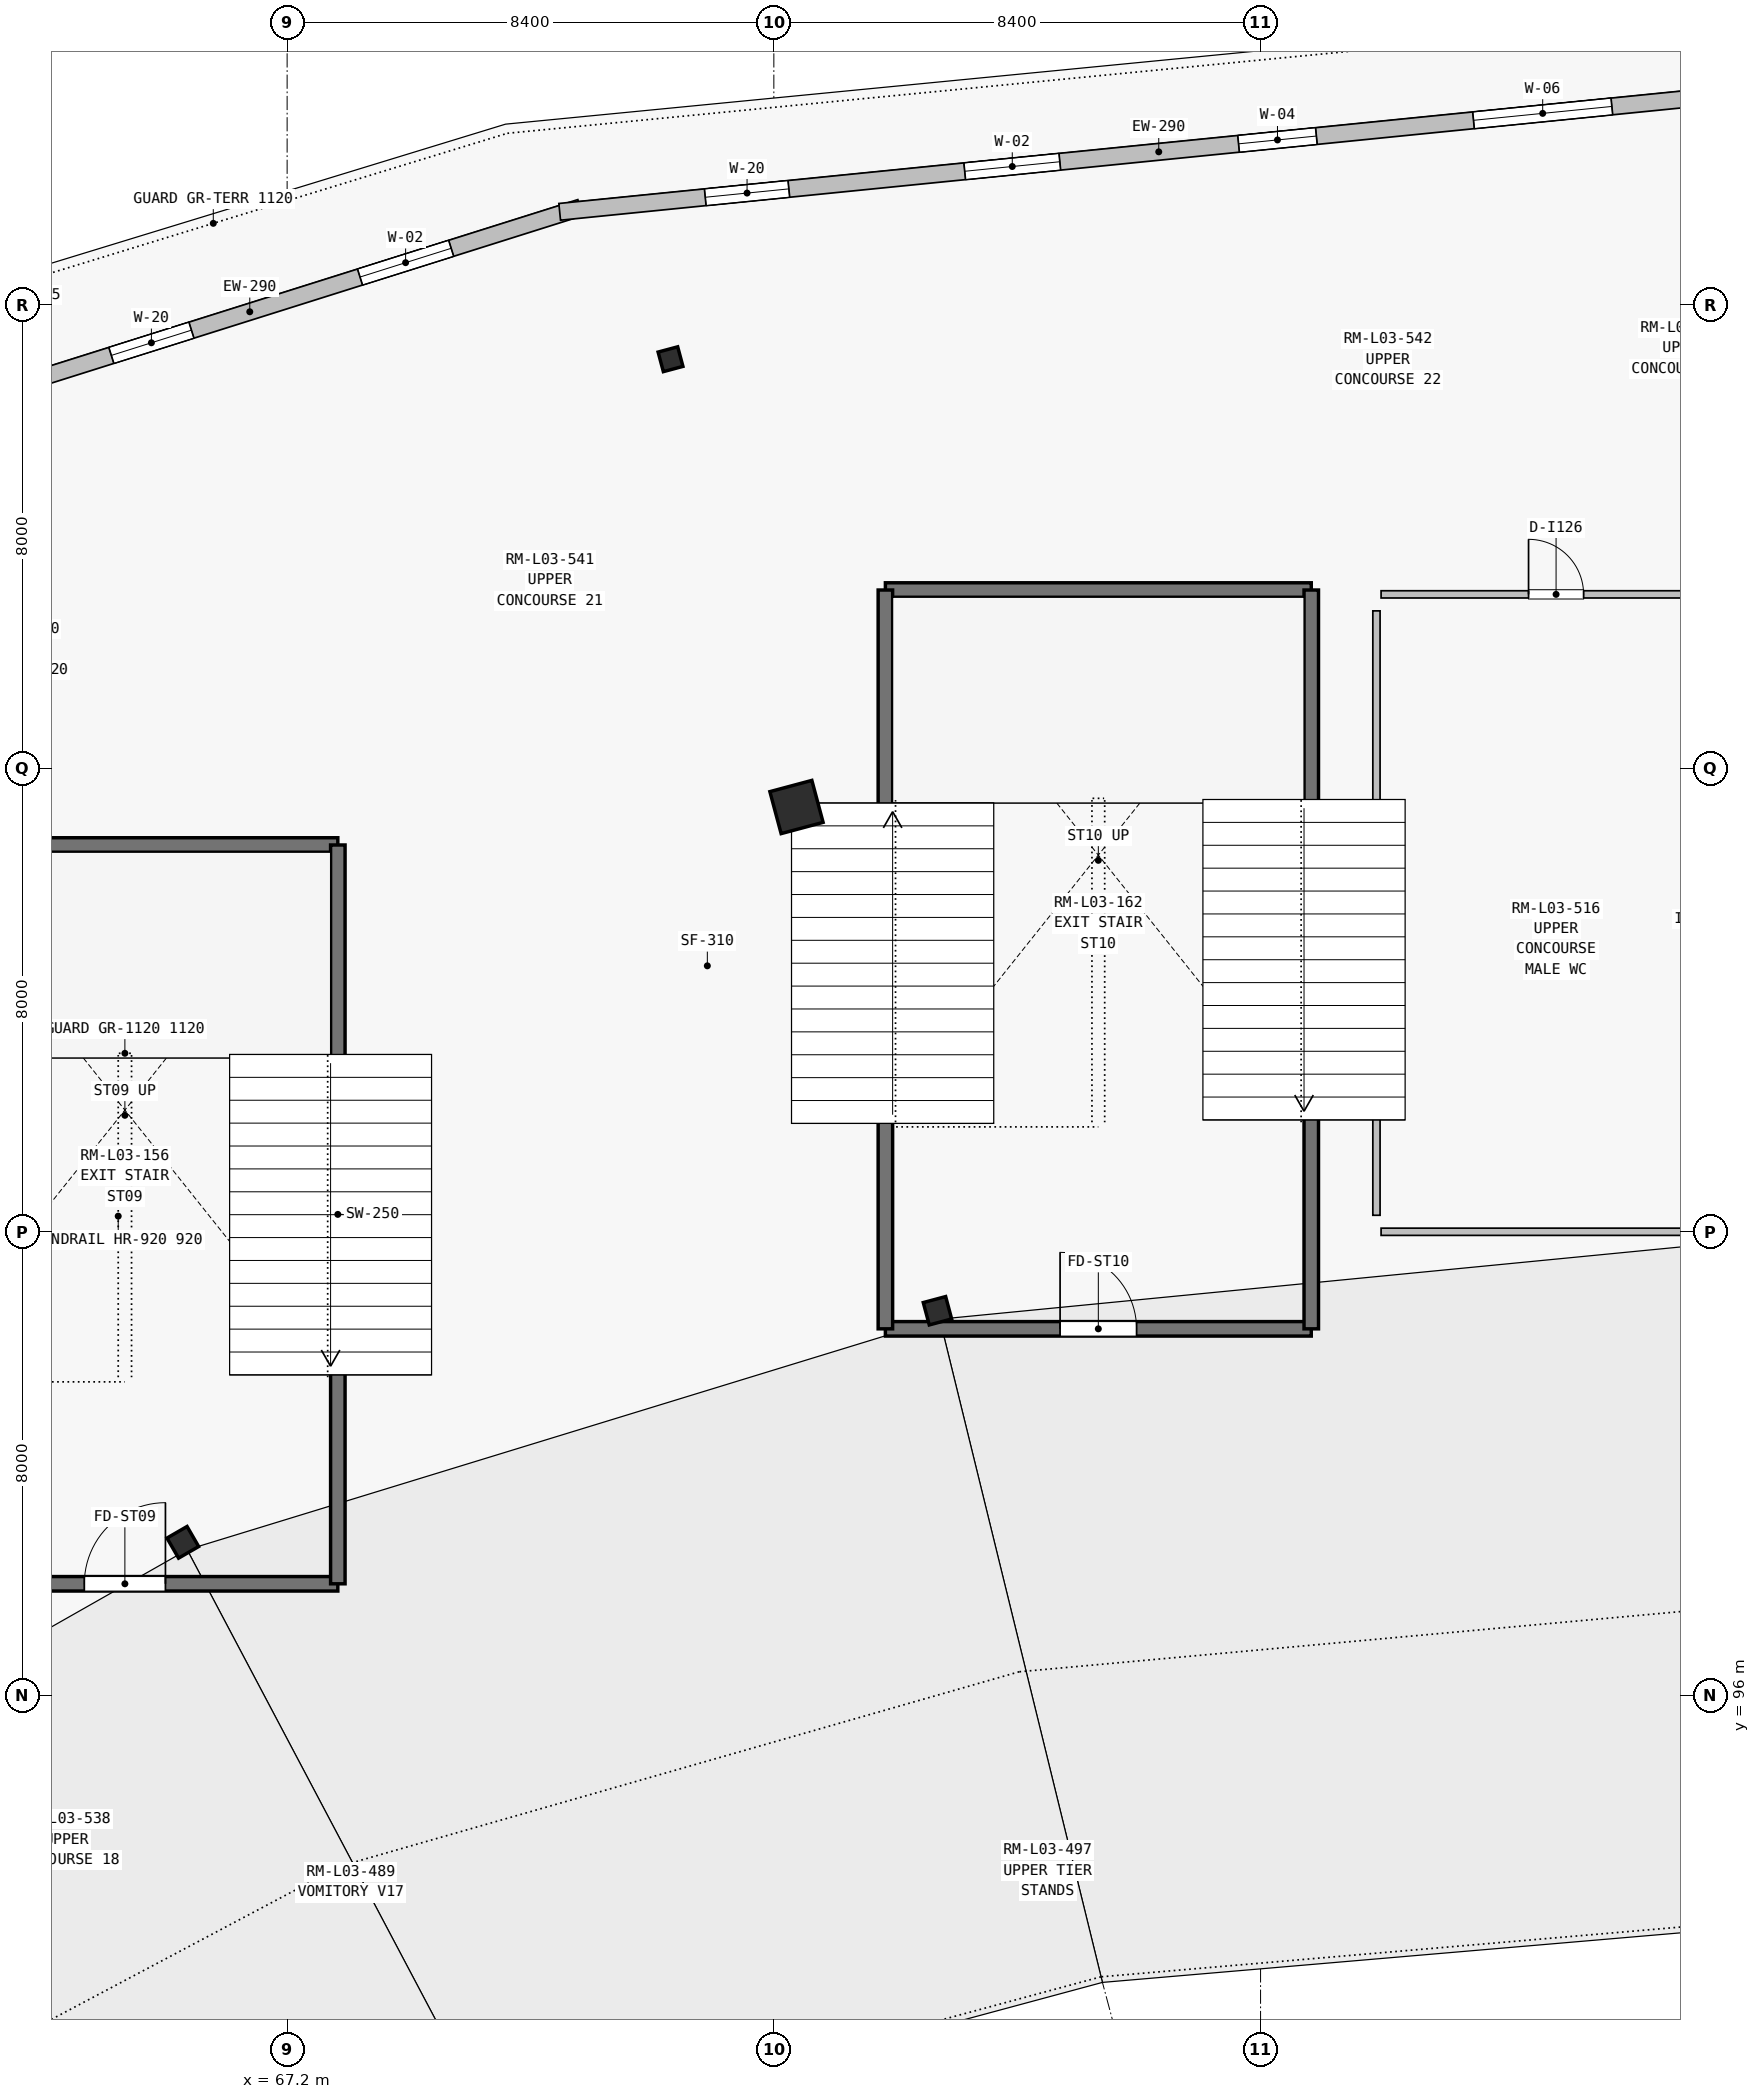
"""IFC4 building model, lengths in metres.
Left out: names, types, materials, properties, quantities, classifications, styles, units other than length and angle.
Written with IfcOpenShell. Run it as: python <this file> out.ifc"""

import sys

from ifc_helpers import new_model, si_unit, direction, frame, frame_2d, origin, origin_2d, place, context, subcontext, project, spatial, rectangle, i_section, extrude, element, fill, save


model = new_model("IFC4")
c1 = context("Model", 3, precision=1e-05, world=origin(), true_north=direction((0.0, 1.0)))
c2 = subcontext(c1, "Body", "Model", "MODEL_VIEW")
j1 = project(units=[si_unit("LENGTHUNIT", "METRE"), si_unit("PLANEANGLEUNIT", "RADIAN")], contexts=[c1])
p1 = place(None, origin())
s1 = spatial("IfcSite", under=j1, at=p1, CompositionType="ELEMENT")
p2 = place(p1, origin())
s2 = spatial("IfcBuilding", under=s1, at=p2, CompositionType="ELEMENT")
p3 = place(p2, frame((0.0, 0.0, 14.4)))
s3 = spatial("IfcBuildingStorey", under=s2, at=p3, CompositionType="ELEMENT", Elevation=14.4)
for number, where, z_axis, x_axis in (
    (1, (78.424, 102.637, 0.0), (0.0, 0.0, 1.0), (-0.259, 0.966, 0.0)),
    (2, (65.4, 98.641, 0.0), (0.0, 0.0, 1.0), (-0.5, 0.866, 0.0)),
):
    element("IfcColumn", number, at=place(p3, frame(where, z_axis=z_axis, x_axis=x_axis)), inside=s3, PredefinedType="COLUMN", context=c2, shape_type="SweptSolid", body=[
        extrude(i_section(OverallWidth=0.4, OverallDepth=0.4, WebThickness=0.016, FlangeThickness=0.028, at=origin_2d()), origin(), (0.0, 0.0, 1.0), 4.5),
    ])
p4 = place(p3, frame((75.991, 111.33, 0.0), z_axis=(0.0, 0.0, 1.0), x_axis=(-0.258819045103, 0.965925826289, 0.0)))
e3 = element("IfcColumn", 3, at=p4, inside=s3, PredefinedType="COLUMN", context=c2, shape_type="SweptSolid", body=[
    extrude(rectangle(XDim=0.75, YDim=0.75, at=origin_2d()), origin(), (0.0, 0.0, 1.0), 4.5),
])
p5 = place(p3, frame((73.817, 119.058, 0.0), z_axis=(0.0, 0.0, 1.0), x_axis=(-0.258819045103, 0.965925826289, 0.0)))
e4 = element("IfcColumn", 4, at=p5, inside=s3, PredefinedType="COLUMN", context=c2, shape_type="SweptSolid", body=[
    extrude(i_section(OverallWidth=0.35, OverallDepth=0.35, WebThickness=0.014, FlangeThickness=0.024, at=origin_2d()), origin(), (0.0, 0.0, 1.0), 4.5),
])
p6 = place(p3, frame((52.983, 115.599, 0.0), z_axis=(0.0, 0.0, 1.0), x_axis=(0.953756113153, 0.30058156401, 0.0)))
e5 = element("IfcWall", 5, at=p6, inside=s3, PredefinedType="SOLIDWALL", context=c2, shape_type="SweptSolid", body=[
    extrude(rectangle(XDim=20.212, YDim=0.29, at=frame_2d((10.106, 0.0))), origin(), (0.0, 0.0, 1.0), 4.26),
])
p7 = place(p6, frame((2.1, 0.0, 0.9)))
e6 = element("IfcOpeningElement", 6, at=p7, cuts=e5, PredefinedType="OPENING", context=c2, shape_type="SweptSolid", body=[
    extrude(rectangle(XDim=2.3, YDim=1.3, at=frame_2d((1.15, 0.65))), frame((0.0, 0.155, 0.0), z_axis=(0.0, -1.0, 0.0), x_axis=(1.0, 0.0, 0.0)), (0.0, 0.0, 1.0), 0.31),
])
p8 = place(p6, frame((7.425, 0.0, 0.9)))
e7 = element("IfcOpeningElement", 7, at=p8, cuts=e5, PredefinedType="OPENING", context=c2, shape_type="SweptSolid", body=[
    extrude(rectangle(XDim=0.85, YDim=2.1, at=frame_2d((0.425, 1.05))), frame((0.0, 0.155, 0.0), z_axis=(0.0, -1.0, 0.0), x_axis=(1.0, 0.0, 0.0)), (0.0, 0.0, 1.0), 0.31),
])
p9 = place(p6, frame((11.725, 0.0, 0.9)))
e8 = element("IfcOpeningElement", 8, at=p9, cuts=e5, PredefinedType="OPENING", context=c2, shape_type="SweptSolid", body=[
    extrude(rectangle(XDim=1.45, YDim=1.4, at=frame_2d((0.725, 0.7))), frame((0.0, 0.155, 0.0), z_axis=(0.0, -1.0, 0.0), x_axis=(1.0, 0.0, 0.0)), (0.0, 0.0, 1.0), 0.31),
])
p10 = place(p6, frame((16.225, 0.0, 0.75)))
e9 = element("IfcOpeningElement", 9, at=p10, cuts=e5, PredefinedType="OPENING", context=c2, shape_type="SweptSolid", body=[
    extrude(rectangle(XDim=1.65, YDim=2.4, at=frame_2d((0.825, 1.2))), frame((0.0, 0.155, 0.0), z_axis=(0.0, -1.0, 0.0), x_axis=(1.0, 0.0, 0.0)), (0.0, 0.0, 1.0), 0.31),
])
p11 = place(p3, frame((71.904, 121.601, 0.0), z_axis=(0.0, 0.0, 1.0), x_axis=(0.995020542998, 0.099670050731, 0.0)))
e10 = element("IfcWall", 10, at=p11, inside=s3, PredefinedType="SOLIDWALL", context=c2, shape_type="SweptSolid", body=[
    extrude(rectangle(XDim=20.781, YDim=0.29, at=frame_2d((10.391, 0.0))), origin(), (0.0, 0.0, 1.0), 4.26),
])
p12 = place(p11, frame((2.525, 0.0, 0.9)))
e11 = element("IfcOpeningElement", 11, at=p12, cuts=e10, PredefinedType="OPENING", context=c2, shape_type="SweptSolid", body=[
    extrude(rectangle(XDim=1.45, YDim=1.4, at=frame_2d((0.725, 0.7))), frame((0.0, 0.155, 0.0), z_axis=(0.0, -1.0, 0.0), x_axis=(1.0, 0.0, 0.0)), (0.0, 0.0, 1.0), 0.31),
])
p13 = place(p11, frame((7.025, 0.0, 0.75)))
e12 = element("IfcOpeningElement", 12, at=p13, cuts=e10, PredefinedType="OPENING", context=c2, shape_type="SweptSolid", body=[
    extrude(rectangle(XDim=1.65, YDim=2.4, at=frame_2d((0.825, 1.2))), frame((0.0, 0.155, 0.0), z_axis=(0.0, -1.0, 0.0), x_axis=(1.0, 0.0, 0.0)), (0.0, 0.0, 1.0), 0.31),
])
p14 = place(p11, frame((11.775, 0.0, 0.75)))
e13 = element("IfcOpeningElement", 13, at=p14, cuts=e10, PredefinedType="OPENING", context=c2, shape_type="SweptSolid", body=[
    extrude(rectangle(XDim=1.35, YDim=2.3, at=frame_2d((0.675, 1.15))), frame((0.0, 0.155, 0.0), z_axis=(0.0, -1.0, 0.0), x_axis=(1.0, 0.0, 0.0)), (0.0, 0.0, 1.0), 0.31),
])
p15 = place(p11, frame((15.85, 0.0, 0.9)))
e14 = element("IfcOpeningElement", 14, at=p15, cuts=e10, PredefinedType="OPENING", context=c2, shape_type="SweptSolid", body=[
    extrude(rectangle(XDim=2.4, YDim=2.1, at=frame_2d((1.2, 1.05))), frame((0.0, 0.155, 0.0), z_axis=(0.0, -1.0, 0.0), x_axis=(1.0, 0.0, 0.0)), (0.0, 0.0, 1.0), 0.31),
])
p16 = place(p3, frame((60.725, 97.925, 0.0), z_axis=(0.0, 0.0, 1.0), x_axis=(1.0, 0.0, 0.0)))
e15 = element("IfcWall", 15, at=p16, inside=s3, PredefinedType="SHEAR", context=c2, shape_type="SweptSolid", body=[
    extrude(rectangle(XDim=7.35, YDim=0.25, at=frame_2d((3.675, 0.0))), origin(), (0.0, 0.0, 1.0), 4.5),
])
p17 = place(p16, frame((2.975, 0.0, 0.0)))
e16 = element("IfcOpeningElement", 16, at=p17, cuts=e15, PredefinedType="OPENING", context=c2, shape_type="SweptSolid", body=[
    extrude(rectangle(XDim=1.4, YDim=2.2, at=frame_2d((0.7, 1.1))), frame((0.0, 0.135, 0.0), z_axis=(0.0, -1.0, 0.0), x_axis=(1.0, 0.0, 0.0)), (0.0, 0.0, 1.0), 0.27),
])
p18 = place(p3, frame((60.725, 110.675, 0.0), z_axis=(0.0, 0.0, 1.0), x_axis=(1.0, 0.0, 0.0)))
e17 = element("IfcWall", 17, at=p18, inside=s3, PredefinedType="SHEAR", context=c2, shape_type="SweptSolid", body=[
    extrude(rectangle(XDim=7.35, YDim=0.25, at=frame_2d((3.675, 0.0))), origin(), (0.0, 0.0, 1.0), 4.5),
])
p19 = place(p3, frame((68.075, 97.925, 0.0), z_axis=(0.0, 0.0, 1.0), x_axis=(0.0, 1.0, 0.0)))
e18 = element("IfcWall", 18, at=p19, inside=s3, PredefinedType="SHEAR", context=c2, shape_type="SweptSolid", body=[
    extrude(rectangle(XDim=12.75, YDim=0.25, at=frame_2d((6.375, 0.0))), origin(), (0.0, 0.0, 1.0), 4.5),
])
p20 = place(p3, frame((77.525, 102.325, 0.0), z_axis=(0.0, 0.0, 1.0), x_axis=(1.0, 0.0, 0.0)))
e19 = element("IfcWall", 19, at=p20, inside=s3, PredefinedType="SHEAR", context=c2, shape_type="SweptSolid", body=[
    extrude(rectangle(XDim=7.35, YDim=0.25, at=frame_2d((3.675, 0.0))), origin(), (0.0, 0.0, 1.0), 4.5),
])
p21 = place(p20, frame((3.015, 0.0, 0.0)))
e20 = element("IfcOpeningElement", 20, at=p21, cuts=e19, PredefinedType="OPENING", context=c2, shape_type="SweptSolid", body=[
    extrude(rectangle(XDim=1.32, YDim=2.2, at=frame_2d((0.66, 1.1))), frame((0.0, 0.135, 0.0), z_axis=(0.0, -1.0, 0.0), x_axis=(1.0, 0.0, 0.0)), (0.0, 0.0, 1.0), 0.27),
])
p22 = place(p3, frame((77.525, 115.075, 0.0), z_axis=(0.0, 0.0, 1.0), x_axis=(1.0, 0.0, 0.0)))
e21 = element("IfcWall", 21, at=p22, inside=s3, PredefinedType="SHEAR", context=c2, shape_type="SweptSolid", body=[
    extrude(rectangle(XDim=7.35, YDim=0.25, at=frame_2d((3.675, 0.0))), origin(), (0.0, 0.0, 1.0), 4.5),
])
for number, where, z_axis, x_axis in (
    (22, (77.525, 102.325, 0.0), (0.0, 0.0, 1.0), (0.0, 1.0, 0.0)),
    (23, (84.875, 102.325, 0.0), (0.0, 0.0, 1.0), (0.0, 1.0, 0.0)),
):
    element("IfcWall", number, at=place(p3, frame(where, z_axis=z_axis, x_axis=x_axis)), inside=s3, PredefinedType="SHEAR", context=c2, shape_type="SweptSolid", body=[
        extrude(rectangle(XDim=12.75, YDim=0.25, at=frame_2d((6.375, 0.0))), origin(), (0.0, 0.0, 1.0), 4.5),
    ])
p23 = place(p3, frame((86.08, 115.0, 0.0), z_axis=(0.0, 0.0, 1.0), x_axis=(1.0, 0.0, 0.0)))
e24 = element("IfcWall", 24, at=p23, inside=s3, PredefinedType="PARTITIONING", context=c2, shape_type="SweptSolid", body=[
    extrude(rectangle(XDim=6.04, YDim=0.125, at=frame_2d((3.02, 0.0))), origin(), (0.0, 0.0, 1.0), 4.19),
])
p24 = place(p23, frame((2.545, 0.0, 0.0)))
e25 = element("IfcOpeningElement", 25, at=p24, cuts=e24, PredefinedType="OPENING", context=c2, shape_type="SweptSolid", body=[
    extrude(rectangle(XDim=0.95, YDim=2.1, at=frame_2d((0.475, 1.05))), frame((0.0, 0.073, 0.0), z_axis=(0.0, -1.0, 0.0), x_axis=(1.0, 0.0, 0.0)), (0.0, 0.0, 1.0), 0.145),
])
p25 = place(p3, frame((91.915, 104.0, 0.0), z_axis=(0.0, 0.0, 1.0), x_axis=(-1.0, 0.0, 0.0)))
e26 = element("IfcWall", 26, at=p25, inside=s3, PredefinedType="PARTITIONING", context=c2, shape_type="SweptSolid", body=[
    extrude(rectangle(XDim=5.835, YDim=0.125, at=frame_2d((2.917, 0.0))), origin(), (0.0, 0.0, 1.0), 2.943),
])
p26 = place(p3, frame((86.0, 104.285, 0.0), z_axis=(0.0, 0.0, 1.0), x_axis=(0.0, 1.0, 0.0)))
e27 = element("IfcWall", 27, at=p26, inside=s3, PredefinedType="PARTITIONING", context=c2, shape_type="SweptSolid", body=[
    extrude(rectangle(XDim=10.43, YDim=0.125, at=frame_2d((5.215, 0.0))), origin(), (0.0, 0.0, 1.0), 4.19),
])
p27 = place(p9, origin())
e28 = element("IfcWindow", 28, at=p27, inside=s3, PartitioningType="SINGLE_PANEL", PredefinedType="WINDOW", context=c2, shape_type="SweptSolid", body=[
    extrude(rectangle(XDim=1.45, YDim=1.4, at=frame_2d((0.725, 0.7))), frame((0.0, 0.03, 0.0), z_axis=(0.0, -1.0, 0.0), x_axis=(1.0, 0.0, 0.0)), (0.0, 0.0, 1.0), 0.06),
])
fill(e8, e28)
p28 = place(p10, origin())
e29 = element("IfcWindow", 29, at=p28, inside=s3, PartitioningType="SINGLE_PANEL", PredefinedType="WINDOW", context=c2, shape_type="SweptSolid", body=[
    extrude(rectangle(XDim=1.65, YDim=2.4, at=frame_2d((0.825, 1.2))), frame((0.0, 0.03, 0.0), z_axis=(0.0, -1.0, 0.0), x_axis=(1.0, 0.0, 0.0)), (0.0, 0.0, 1.0), 0.06),
])
fill(e9, e29)
p29 = place(p12, origin())
e30 = element("IfcWindow", 30, at=p29, inside=s3, PartitioningType="SINGLE_PANEL", PredefinedType="WINDOW", context=c2, shape_type="SweptSolid", body=[
    extrude(rectangle(XDim=1.45, YDim=1.4, at=frame_2d((0.725, 0.7))), frame((0.0, 0.03, 0.0), z_axis=(0.0, -1.0, 0.0), x_axis=(1.0, 0.0, 0.0)), (0.0, 0.0, 1.0), 0.06),
])
fill(e11, e30)
p30 = place(p13, origin())
e31 = element("IfcWindow", 31, at=p30, inside=s3, PartitioningType="SINGLE_PANEL", PredefinedType="WINDOW", context=c2, shape_type="SweptSolid", body=[
    extrude(rectangle(XDim=1.65, YDim=2.4, at=frame_2d((0.825, 1.2))), frame((0.0, 0.03, 0.0), z_axis=(0.0, -1.0, 0.0), x_axis=(1.0, 0.0, 0.0)), (0.0, 0.0, 1.0), 0.06),
])
fill(e12, e31)
p31 = place(p14, origin())
e32 = element("IfcWindow", 32, at=p31, inside=s3, PartitioningType="SINGLE_PANEL", PredefinedType="WINDOW", context=c2, shape_type="SweptSolid", body=[
    extrude(rectangle(XDim=1.35, YDim=2.3, at=frame_2d((0.675, 1.15))), frame((0.0, 0.03, 0.0), z_axis=(0.0, -1.0, 0.0), x_axis=(1.0, 0.0, 0.0)), (0.0, 0.0, 1.0), 0.06),
])
fill(e13, e32)
p32 = place(p15, origin())
e33 = element("IfcWindow", 33, at=p32, inside=s3, PartitioningType="SINGLE_PANEL", PredefinedType="WINDOW", context=c2, shape_type="SweptSolid", body=[
    extrude(rectangle(XDim=2.4, YDim=2.1, at=frame_2d((1.2, 1.05))), frame((0.0, 0.03, 0.0), z_axis=(0.0, -1.0, 0.0), x_axis=(1.0, 0.0, 0.0)), (0.0, 0.0, 1.0), 0.06),
])
fill(e14, e33)
p33 = place(p17, origin())
e34 = element("IfcDoor", 34, at=p33, inside=s3, OperationType="SINGLE_SWING_RIGHT", PredefinedType="DOOR", context=c2, shape_type="SweptSolid", body=[
    extrude(rectangle(XDim=1.4, YDim=2.2, at=frame_2d((0.7, 1.1))), frame((0.0, 0.025, 0.0), z_axis=(0.0, -1.0, 0.0), x_axis=(1.0, 0.0, 0.0)), (0.0, 0.0, 1.0), 0.05),
])
fill(e16, e34)
p34 = place(p21, origin())
e35 = element("IfcDoor", 35, at=p34, inside=s3, OperationType="SINGLE_SWING_LEFT", PredefinedType="DOOR", context=c2, shape_type="SweptSolid", body=[
    extrude(rectangle(XDim=1.32, YDim=2.2, at=frame_2d((0.66, 1.1))), frame((0.0, 0.025, 0.0), z_axis=(0.0, -1.0, 0.0), x_axis=(1.0, 0.0, 0.0)), (0.0, 0.0, 1.0), 0.05),
])
fill(e20, e35)
p35 = place(p24, origin())
e36 = element("IfcDoor", 36, at=p35, inside=s3, OperationType="SINGLE_SWING_LEFT", PredefinedType="DOOR", context=c2, shape_type="SweptSolid", body=[
    extrude(rectangle(XDim=0.95, YDim=2.1, at=frame_2d((0.475, 1.05))), frame((0.0, 0.025, 0.0), z_axis=(0.0, -1.0, 0.0), x_axis=(1.0, 0.0, 0.0)), (0.0, 0.0, 1.0), 0.05),
])
fill(e25, e36)
save(model, sys.argv[1])
